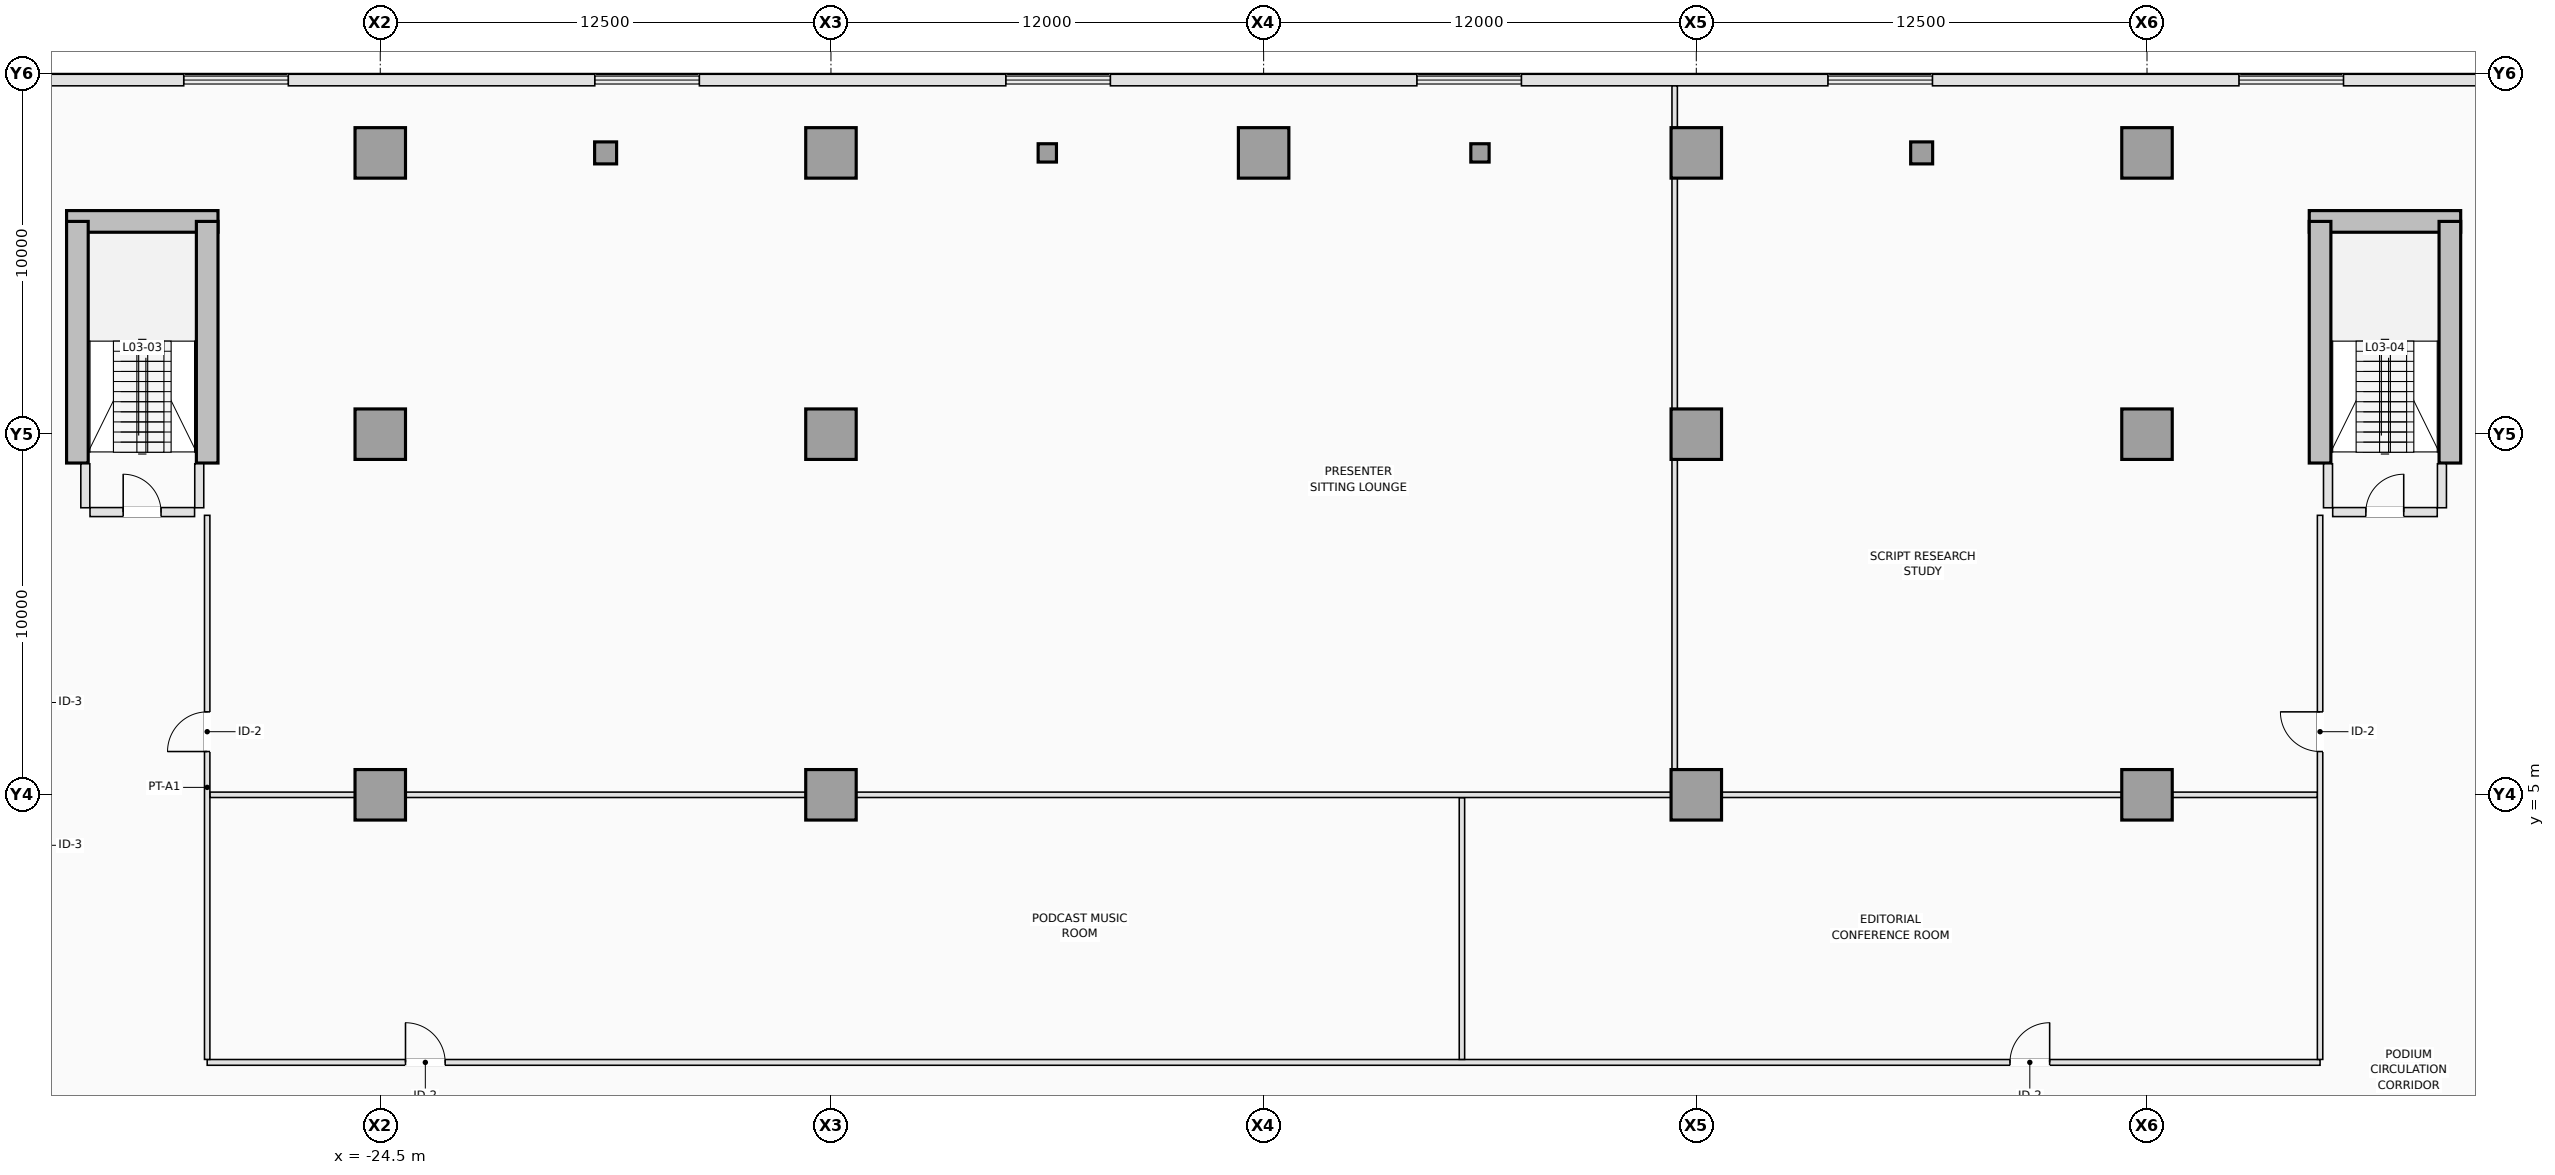
"""IFC4 building model, lengths in metres.
Left out: names, types, materials, properties, quantities, classifications, styles, units other than length and angle.
Written with IfcOpenShell. Run it as: python <this file> out.ifc"""

import sys

from ifc_helpers import new_model, si_unit, direction, frame, frame_2d, origin, origin_2d, place, context, subcontext, project, spatial, rectangle, hollow_circle, extrude, element, fill, save


model = new_model("IFC4")
c1 = context("Model", 3, precision=1e-05, world=origin(), true_north=direction((0.0, 1.0)))
c2 = subcontext(c1, "Body", "Model", "MODEL_VIEW")
j1 = project(units=[si_unit("LENGTHUNIT", "METRE"), si_unit("PLANEANGLEUNIT", "RADIAN")], contexts=[c1])
p1 = place(None, origin())
s1 = spatial("IfcSite", under=j1, at=p1, CompositionType="ELEMENT")
p2 = place(p1, origin())
s2 = spatial("IfcBuilding", under=s1, at=p2, CompositionType="ELEMENT")
p3 = place(p2, frame((0.0, 0.0, 14.0)))
s3 = spatial("IfcBuildingStorey", under=s2, at=p3, CompositionType="ELEMENT", Elevation=14.0)
p4 = place(p3, frame((-33.2, 20.9, 0.0), z_axis=(0.0, 0.0, 1.0), x_axis=(1.0, 0.0, 0.0)))
e1 = element("IfcWall", 1, at=p4, inside=s3, PredefinedType="SHEAR", context=c2, shape_type="SweptSolid", body=[
    extrude(rectangle(XDim=4.2, YDim=0.6, at=frame_2d((2.1, 0.0))), origin(), (0.0, 0.0, 1.0), 4.5),
])
for number, where, z_axis, x_axis in (
    (2, (-32.9, 14.2, 0.0), (0.0, 0.0, 1.0), (0.0, 1.0, 0.0)),
    (3, (-29.3, 14.2, 0.0), (0.0, 0.0, 1.0), (0.0, 1.0, 0.0)),
):
    element("IfcWall", number, at=place(p3, frame(where, z_axis=z_axis, x_axis=x_axis)), inside=s3, PredefinedType="SHEAR", context=c2, shape_type="SweptSolid", body=[
        extrude(rectangle(XDim=6.7, YDim=0.6, at=frame_2d((3.35, 0.0))), origin(), (0.0, 0.0, 1.0), 4.5),
    ])
p5 = place(p3, frame((29.0, 20.9, 0.0), z_axis=(0.0, 0.0, 1.0), x_axis=(1.0, 0.0, 0.0)))
e4 = element("IfcWall", 4, at=p5, inside=s3, PredefinedType="SHEAR", context=c2, shape_type="SweptSolid", body=[
    extrude(rectangle(XDim=4.2, YDim=0.6, at=frame_2d((2.1, 0.0))), origin(), (0.0, 0.0, 1.0), 4.5),
])
for number, where, z_axis, x_axis in (
    (5, (29.3, 14.2, 0.0), (0.0, 0.0, 1.0), (0.0, 1.0, 0.0)),
    (6, (32.9, 14.2, 0.0), (0.0, 0.0, 1.0), (0.0, 1.0, 0.0)),
):
    element("IfcWall", number, at=place(p3, frame(where, z_axis=z_axis, x_axis=x_axis)), inside=s3, PredefinedType="SHEAR", context=c2, shape_type="SweptSolid", body=[
        extrude(rectangle(XDim=6.7, YDim=0.6, at=frame_2d((3.35, 0.0))), origin(), (0.0, 0.0, 1.0), 4.5),
    ])
for number, where, z_axis, x_axis in (
    (7, (-24.5, 5.0, 0.0), (0.0, 0.0, 1.0), (1.0, 0.0, 0.0)),
    (8, (-12.0, 5.0, 0.0), (0.0, 0.0, 1.0), (1.0, 0.0, 0.0)),
    (9, (12.0, 5.0, 0.0), (0.0, 0.0, 1.0), (1.0, 0.0, 0.0)),
    (10, (24.5, 5.0, 0.0), (0.0, 0.0, 1.0), (1.0, 0.0, 0.0)),
    (11, (-24.5, 15.0, 0.0), (0.0, 0.0, 1.0), (1.0, 0.0, 0.0)),
    (12, (-12.0, 15.0, 0.0), (0.0, 0.0, 1.0), (1.0, 0.0, 0.0)),
    (13, (12.0, 15.0, 0.0), (0.0, 0.0, 1.0), (1.0, 0.0, 0.0)),
    (14, (24.5, 15.0, 0.0), (0.0, 0.0, 1.0), (1.0, 0.0, 0.0)),
    (15, (-24.5, 22.8, 0.0), (0.0, 0.0, 1.0), (1.0, 0.0, 0.0)),
    (16, (-12.0, 22.8, 0.0), (0.0, 0.0, 1.0), (1.0, 0.0, 0.0)),
    (17, (0.0, 22.8, 0.0), (0.0, 0.0, 1.0), (1.0, 0.0, 0.0)),
    (18, (12.0, 22.8, 0.0), (0.0, 0.0, 1.0), (1.0, 0.0, 0.0)),
    (19, (24.5, 22.8, 0.0), (0.0, 0.0, 1.0), (1.0, 0.0, 0.0)),
):
    element("IfcColumn", number, at=place(p3, frame(where, z_axis=z_axis, x_axis=x_axis)), inside=s3, PredefinedType="COLUMN", context=c2, shape_type="SweptSolid", body=[
        extrude(rectangle(XDim=1.4, YDim=1.4, at=origin_2d()), origin(), (0.0, 0.0, 1.0), 4.5),
    ])
for number, where, z_axis, x_axis in (
    (20, (-18.25, 22.8, 0.0), (0.0, 0.0, 1.0), (1.0, 0.0, 0.0)),
    (21, (18.25, 22.8, 0.0), (0.0, 0.0, 1.0), (1.0, 0.0, 0.0)),
):
    element("IfcColumn", number, at=place(p3, frame(where, z_axis=z_axis, x_axis=x_axis)), inside=s3, PredefinedType="COLUMN", context=c2, shape_type="SweptSolid", body=[
        extrude(hollow_circle(Radius=0.305, WallThickness=0.025, at=origin_2d()), origin(), (0.0, 0.0, 1.0), 4.5),
    ])
for number, where, z_axis, x_axis in (
    (22, (-6.0, 22.8, 0.0), (0.0, 0.0, 1.0), (1.0, 0.0, 0.0)),
    (23, (6.0, 22.8, 0.0), (0.0, 0.0, 1.0), (1.0, 0.0, 0.0)),
):
    element("IfcColumn", number, at=place(p3, frame(where, z_axis=z_axis, x_axis=x_axis)), inside=s3, PredefinedType="COLUMN", context=c2, shape_type="SweptSolid", body=[
        extrude(hollow_circle(Radius=0.254, WallThickness=0.022, at=origin_2d()), origin(), (0.0, 0.0, 1.0), 4.5),
    ])
p6 = place(p3, frame((-34.9, 24.82, 0.0), z_axis=(0.0, 0.0, 1.0), x_axis=(1.0, 0.0, 0.0)))
e24 = element("IfcWall", 24, at=p6, inside=s3, PredefinedType="STANDARD", context=c2, shape_type="SweptSolid", body=[
    extrude(rectangle(XDim=4.949, YDim=0.32, at=frame_2d((2.475, 0.0))), origin(), (0.0, 0.0, 1.0), 4.2),
])
for number, where, z_axis, x_axis in (
    (25, (-27.05, 24.82, 0.0), (0.0, 0.0, 1.0), (1.0, 0.0, 0.0)),
    (26, (-15.649, 24.82, 0.0), (0.0, 0.0, 1.0), (1.0, 0.0, 0.0)),
    (27, (-4.25, 24.82, 0.0), (0.0, 0.0, 1.0), (1.0, 0.0, 0.0)),
    (28, (7.15, 24.82, 0.0), (0.0, 0.0, 1.0), (1.0, 0.0, 0.0)),
    (29, (18.551, 24.82, 0.0), (0.0, 0.0, 1.0), (1.0, 0.0, 0.0)),
):
    element("IfcWall", number, at=place(p3, frame(where, z_axis=z_axis, x_axis=x_axis)), inside=s3, PredefinedType="STANDARD", context=c2, shape_type="SweptSolid", body=[
        extrude(rectangle(XDim=8.499, YDim=0.32, at=frame_2d((4.25, 0.0))), origin(), (0.0, 0.0, 1.0), 4.2),
    ])
p7 = place(p3, frame((29.95, 24.82, 0.0), z_axis=(0.0, 0.0, 1.0), x_axis=(1.0, 0.0, 0.0)))
e30 = element("IfcWall", 30, at=p7, inside=s3, PredefinedType="STANDARD", context=c2, shape_type="SweptSolid", body=[
    extrude(rectangle(XDim=4.949, YDim=0.32, at=frame_2d((2.475, 0.0))), origin(), (0.0, 0.0, 1.0), 4.2),
])
p8 = place(p3, frame((-32.55, 12.84, 0.0), z_axis=(0.0, 0.0, 1.0), x_axis=(1.0, 0.0, 0.0)))
e31 = element("IfcWall", 31, at=p8, inside=s3, PredefinedType="PARTITIONING", context=c2, shape_type="SweptSolid", body=[
    extrude(rectangle(XDim=2.9, YDim=0.25, at=frame_2d((1.45, 0.0))), origin(), (0.0, 0.0, 1.0), 4.2),
])
p9 = place(p8, frame((0.92, 0.0, 0.0)))
e32 = element("IfcOpeningElement", 32, at=p9, cuts=e31, PredefinedType="OPENING", context=c2, shape_type="SweptSolid", body=[
    extrude(rectangle(XDim=1.05, YDim=2.15, at=frame_2d((0.525, 1.075))), frame((0.0, 0.135, 0.0), z_axis=(0.0, -1.0, 0.0), x_axis=(1.0, 0.0, 0.0)), (0.0, 0.0, 1.0), 0.27),
])
p10 = place(p3, frame((29.65, 12.84, 0.0), z_axis=(0.0, 0.0, 1.0), x_axis=(1.0, 0.0, 0.0)))
e33 = element("IfcWall", 33, at=p10, inside=s3, PredefinedType="PARTITIONING", context=c2, shape_type="SweptSolid", body=[
    extrude(rectangle(XDim=2.9, YDim=0.25, at=frame_2d((1.45, 0.0))), origin(), (0.0, 0.0, 1.0), 4.2),
])
p11 = place(p10, frame((0.92, 0.0, 0.0)))
e34 = element("IfcOpeningElement", 34, at=p11, cuts=e33, PredefinedType="OPENING", context=c2, shape_type="SweptSolid", body=[
    extrude(rectangle(XDim=1.05, YDim=2.15, at=frame_2d((0.525, 1.075))), frame((0.0, 0.135, 0.0), z_axis=(0.0, -1.0, 0.0), x_axis=(1.0, 0.0, 0.0)), (0.0, 0.0, 1.0), 0.27),
])
for number, where, z_axis, x_axis in (
    (35, (-32.68, 12.96, 0.0), (0.0, 0.0, 1.0), (0.0, 1.0, 0.0)),
    (36, (-29.52, 12.96, 0.0), (0.0, 0.0, 1.0), (0.0, 1.0, 0.0)),
    (37, (29.52, 12.96, 0.0), (0.0, 0.0, 1.0), (0.0, 1.0, 0.0)),
    (38, (32.68, 12.96, 0.0), (0.0, 0.0, 1.0), (0.0, 1.0, 0.0)),
):
    element("IfcWall", number, at=place(p3, frame(where, z_axis=z_axis, x_axis=x_axis)), inside=s3, PredefinedType="PARTITIONING", context=c2, shape_type="SweptSolid", body=[
        extrude(rectangle(XDim=1.22, YDim=0.25, at=frame_2d((0.61, 0.0))), origin(), (0.0, 0.0, 1.0), 4.2),
    ])
p12 = place(p3, frame((-29.3, -2.42, 0.0), z_axis=(0.0, 0.0, 1.0), x_axis=(1.0, 0.0, 0.0)))
e39 = element("IfcWall", 39, at=p12, inside=s3, PredefinedType="PARTITIONING", context=c2, shape_type="SweptSolid", body=[
    extrude(rectangle(XDim=58.6, YDim=0.16, at=frame_2d((29.3, 0.0))), origin(), (0.0, 0.0, 1.0), 4.2),
])
p13 = place(p12, frame((5.5, 0.0, 0.0)))
e40 = element("IfcOpeningElement", 40, at=p13, cuts=e39, PredefinedType="OPENING", context=c2, shape_type="SweptSolid", body=[
    extrude(rectangle(XDim=1.1, YDim=2.15, at=frame_2d((0.55, 1.075))), frame((0.0, 0.09, 0.0), z_axis=(0.0, -1.0, 0.0), x_axis=(1.0, 0.0, 0.0)), (0.0, 0.0, 1.0), 0.18),
])
p14 = place(p12, frame((50.0, 0.0, 0.0)))
e41 = element("IfcOpeningElement", 41, at=p14, cuts=e39, PredefinedType="OPENING", context=c2, shape_type="SweptSolid", body=[
    extrude(rectangle(XDim=1.1, YDim=2.15, at=frame_2d((0.55, 1.075))), frame((0.0, 0.09, 0.0), z_axis=(0.0, -1.0, 0.0), x_axis=(1.0, 0.0, 0.0)), (0.0, 0.0, 1.0), 0.18),
])
p15 = place(p3, frame((-29.3, -2.338, 0.0), z_axis=(0.0, 0.0, 1.0), x_axis=(0.0, 1.0, 0.0)))
e42 = element("IfcWall", 42, at=p15, inside=s3, PredefinedType="PARTITIONING", context=c2, shape_type="SweptSolid", body=[
    extrude(rectangle(XDim=15.088, YDim=0.15, at=frame_2d((7.544, 0.0))), origin(), (0.0, 0.0, 1.0), 4.2),
])
p16 = place(p15, frame((8.538, 0.0, 0.0)))
e43 = element("IfcOpeningElement", 43, at=p16, cuts=e42, PredefinedType="OPENING", context=c2, shape_type="SweptSolid", body=[
    extrude(rectangle(XDim=1.1, YDim=2.15, at=frame_2d((0.55, 1.075))), frame((0.0, 0.085, 0.0), z_axis=(0.0, -1.0, 0.0), x_axis=(1.0, 0.0, 0.0)), (0.0, 0.0, 1.0), 0.17),
])
p17 = place(p3, frame((29.3, -2.338, 0.0), z_axis=(0.0, 0.0, 1.0), x_axis=(0.0, 1.0, 0.0)))
e44 = element("IfcWall", 44, at=p17, inside=s3, PredefinedType="PARTITIONING", context=c2, shape_type="SweptSolid", body=[
    extrude(rectangle(XDim=15.088, YDim=0.15, at=frame_2d((7.544, 0.0))), origin(), (0.0, 0.0, 1.0), 4.2),
])
p18 = place(p17, frame((8.538, 0.0, 0.0)))
e45 = element("IfcOpeningElement", 45, at=p18, cuts=e44, PredefinedType="OPENING", context=c2, shape_type="SweptSolid", body=[
    extrude(rectangle(XDim=1.1, YDim=2.15, at=frame_2d((0.55, 1.075))), frame((0.0, 0.085, 0.0), z_axis=(0.0, -1.0, 0.0), x_axis=(1.0, 0.0, 0.0)), (0.0, 0.0, 1.0), 0.17),
])
p19 = place(p3, frame((5.5, -2.338, 0.0), z_axis=(0.0, 0.0, 1.0), x_axis=(0.0, 1.0, 0.0)))
e46 = element("IfcWall", 46, at=p19, inside=s3, PredefinedType="PARTITIONING", context=c2, shape_type="SweptSolid", body=[
    extrude(rectangle(XDim=7.258, YDim=0.15, at=frame_2d((3.629, 0.0))), origin(), (0.0, 0.0, 1.0), 4.2),
])
p20 = place(p3, frame((-29.22, 5.0, 0.0), z_axis=(0.0, 0.0, 1.0), x_axis=(1.0, 0.0, 0.0)))
e47 = element("IfcWall", 47, at=p20, inside=s3, PredefinedType="PARTITIONING", context=c2, shape_type="SweptSolid", body=[
    extrude(rectangle(XDim=4.018, YDim=0.15, at=frame_2d((2.009, 0.0))), origin(), (0.0, 0.0, 1.0), 3.176),
])
p21 = place(p3, frame((-23.798, 5.0, 0.0), z_axis=(0.0, 0.0, 1.0), x_axis=(1.0, 0.0, 0.0)))
e48 = element("IfcWall", 48, at=p21, inside=s3, PredefinedType="PARTITIONING", context=c2, shape_type="SweptSolid", body=[
    extrude(rectangle(XDim=11.096, YDim=0.15, at=frame_2d((5.548, 0.0))), origin(), (0.0, 0.0, 1.0), 3.012),
])
p22 = place(p3, frame((-11.298, 5.0, 0.0), z_axis=(0.0, 0.0, 1.0), x_axis=(1.0, 0.0, 0.0)))
e49 = element("IfcWall", 49, at=p22, inside=s3, PredefinedType="PARTITIONING", context=c2, shape_type="SweptSolid", body=[
    extrude(rectangle(XDim=22.596, YDim=0.15, at=frame_2d((11.298, 0.0))), origin(), (0.0, 0.0, 1.0), 3.0),
])
p23 = place(p3, frame((12.702, 5.0, 0.0), z_axis=(0.0, 0.0, 1.0), x_axis=(1.0, 0.0, 0.0)))
e50 = element("IfcWall", 50, at=p23, inside=s3, PredefinedType="PARTITIONING", context=c2, shape_type="SweptSolid", body=[
    extrude(rectangle(XDim=11.096, YDim=0.15, at=frame_2d((5.548, 0.0))), origin(), (0.0, 0.0, 1.0), 3.012),
])
p24 = place(p3, frame((25.202, 5.0, 0.0), z_axis=(0.0, 0.0, 1.0), x_axis=(1.0, 0.0, 0.0)))
e51 = element("IfcWall", 51, at=p24, inside=s3, PredefinedType="PARTITIONING", context=c2, shape_type="SweptSolid", body=[
    extrude(rectangle(XDim=4.018, YDim=0.15, at=frame_2d((2.009, 0.0))), origin(), (0.0, 0.0, 1.0), 3.176),
])
p25 = place(p3, frame((11.4, 5.702, 0.0), z_axis=(0.0, 0.0, 1.0), x_axis=(0.0, 1.0, 0.0)))
e52 = element("IfcWall", 52, at=p25, inside=s3, PredefinedType="PARTITIONING", context=c2, shape_type="SweptSolid", body=[
    extrude(rectangle(XDim=8.596, YDim=0.15, at=frame_2d((4.298, 0.0))), origin(), (0.0, 0.0, 1.0), 4.2),
])
p26 = place(p3, frame((11.4, 15.702, 0.0), z_axis=(0.0, 0.0, 1.0), x_axis=(0.0, 1.0, 0.0)))
e53 = element("IfcWall", 53, at=p26, inside=s3, PredefinedType="PARTITIONING", context=c2, shape_type="SweptSolid", body=[
    extrude(rectangle(XDim=6.396, YDim=0.15, at=frame_2d((3.198, 0.0))), origin(), (0.0, 0.0, 1.0), 4.2),
])
p27 = place(p3, frame((11.4, 23.502, 0.0), z_axis=(0.0, 0.0, 1.0), x_axis=(0.0, 1.0, 0.0)))
e54 = element("IfcWall", 54, at=p27, inside=s3, PredefinedType="PARTITIONING", context=c2, shape_type="SweptSolid", body=[
    extrude(rectangle(XDim=1.156, YDim=0.15, at=frame_2d((0.578, 0.0))), origin(), (0.0, 0.0, 1.0), 4.2),
])
p28 = place(p9, origin())
e55 = element("IfcDoor", 55, at=p28, inside=s3, OperationType="SINGLE_SWING_LEFT", PredefinedType="DOOR", context=c2, shape_type="SweptSolid", body=[
    extrude(rectangle(XDim=1.05, YDim=2.15, at=frame_2d((0.525, 1.075))), frame((0.0, 0.025, 0.0), z_axis=(0.0, -1.0, 0.0), x_axis=(1.0, 0.0, 0.0)), (0.0, 0.0, 1.0), 0.05),
])
fill(e32, e55)
p29 = place(p11, origin())
e56 = element("IfcDoor", 56, at=p29, inside=s3, OperationType="SINGLE_SWING_RIGHT", PredefinedType="DOOR", context=c2, shape_type="SweptSolid", body=[
    extrude(rectangle(XDim=1.05, YDim=2.15, at=frame_2d((0.525, 1.075))), frame((0.0, 0.025, 0.0), z_axis=(0.0, -1.0, 0.0), x_axis=(1.0, 0.0, 0.0)), (0.0, 0.0, 1.0), 0.05),
])
fill(e34, e56)
p30 = place(p13, origin())
e57 = element("IfcDoor", 57, at=p30, inside=s3, OperationType="SINGLE_SWING_LEFT", PredefinedType="DOOR", context=c2, shape_type="SweptSolid", body=[
    extrude(rectangle(XDim=1.1, YDim=2.15, at=frame_2d((0.55, 1.075))), frame((0.0, 0.025, 0.0), z_axis=(0.0, -1.0, 0.0), x_axis=(1.0, 0.0, 0.0)), (0.0, 0.0, 1.0), 0.05),
])
fill(e40, e57)
p31 = place(p14, origin())
e58 = element("IfcDoor", 58, at=p31, inside=s3, OperationType="SINGLE_SWING_RIGHT", PredefinedType="DOOR", context=c2, shape_type="SweptSolid", body=[
    extrude(rectangle(XDim=1.1, YDim=2.15, at=frame_2d((0.55, 1.075))), frame((0.0, 0.025, 0.0), z_axis=(0.0, -1.0, 0.0), x_axis=(1.0, 0.0, 0.0)), (0.0, 0.0, 1.0), 0.05),
])
fill(e41, e58)
p32 = place(p16, origin())
e59 = element("IfcDoor", 59, at=p32, inside=s3, OperationType="SINGLE_SWING_LEFT", PredefinedType="DOOR", context=c2, shape_type="SweptSolid", body=[
    extrude(rectangle(XDim=1.1, YDim=2.15, at=frame_2d((0.55, 1.075))), frame((0.0, 0.025, 0.0), z_axis=(0.0, -1.0, 0.0), x_axis=(1.0, 0.0, 0.0)), (0.0, 0.0, 1.0), 0.05),
])
fill(e43, e59)
p33 = place(p18, origin())
e60 = element("IfcDoor", 60, at=p33, inside=s3, OperationType="SINGLE_SWING_RIGHT", PredefinedType="DOOR", context=c2, shape_type="SweptSolid", body=[
    extrude(rectangle(XDim=1.1, YDim=2.15, at=frame_2d((0.55, 1.075))), frame((0.0, 0.025, 0.0), z_axis=(0.0, -1.0, 0.0), x_axis=(1.0, 0.0, 0.0)), (0.0, 0.0, 1.0), 0.05),
])
fill(e45, e60)
save(model, sys.argv[1])
